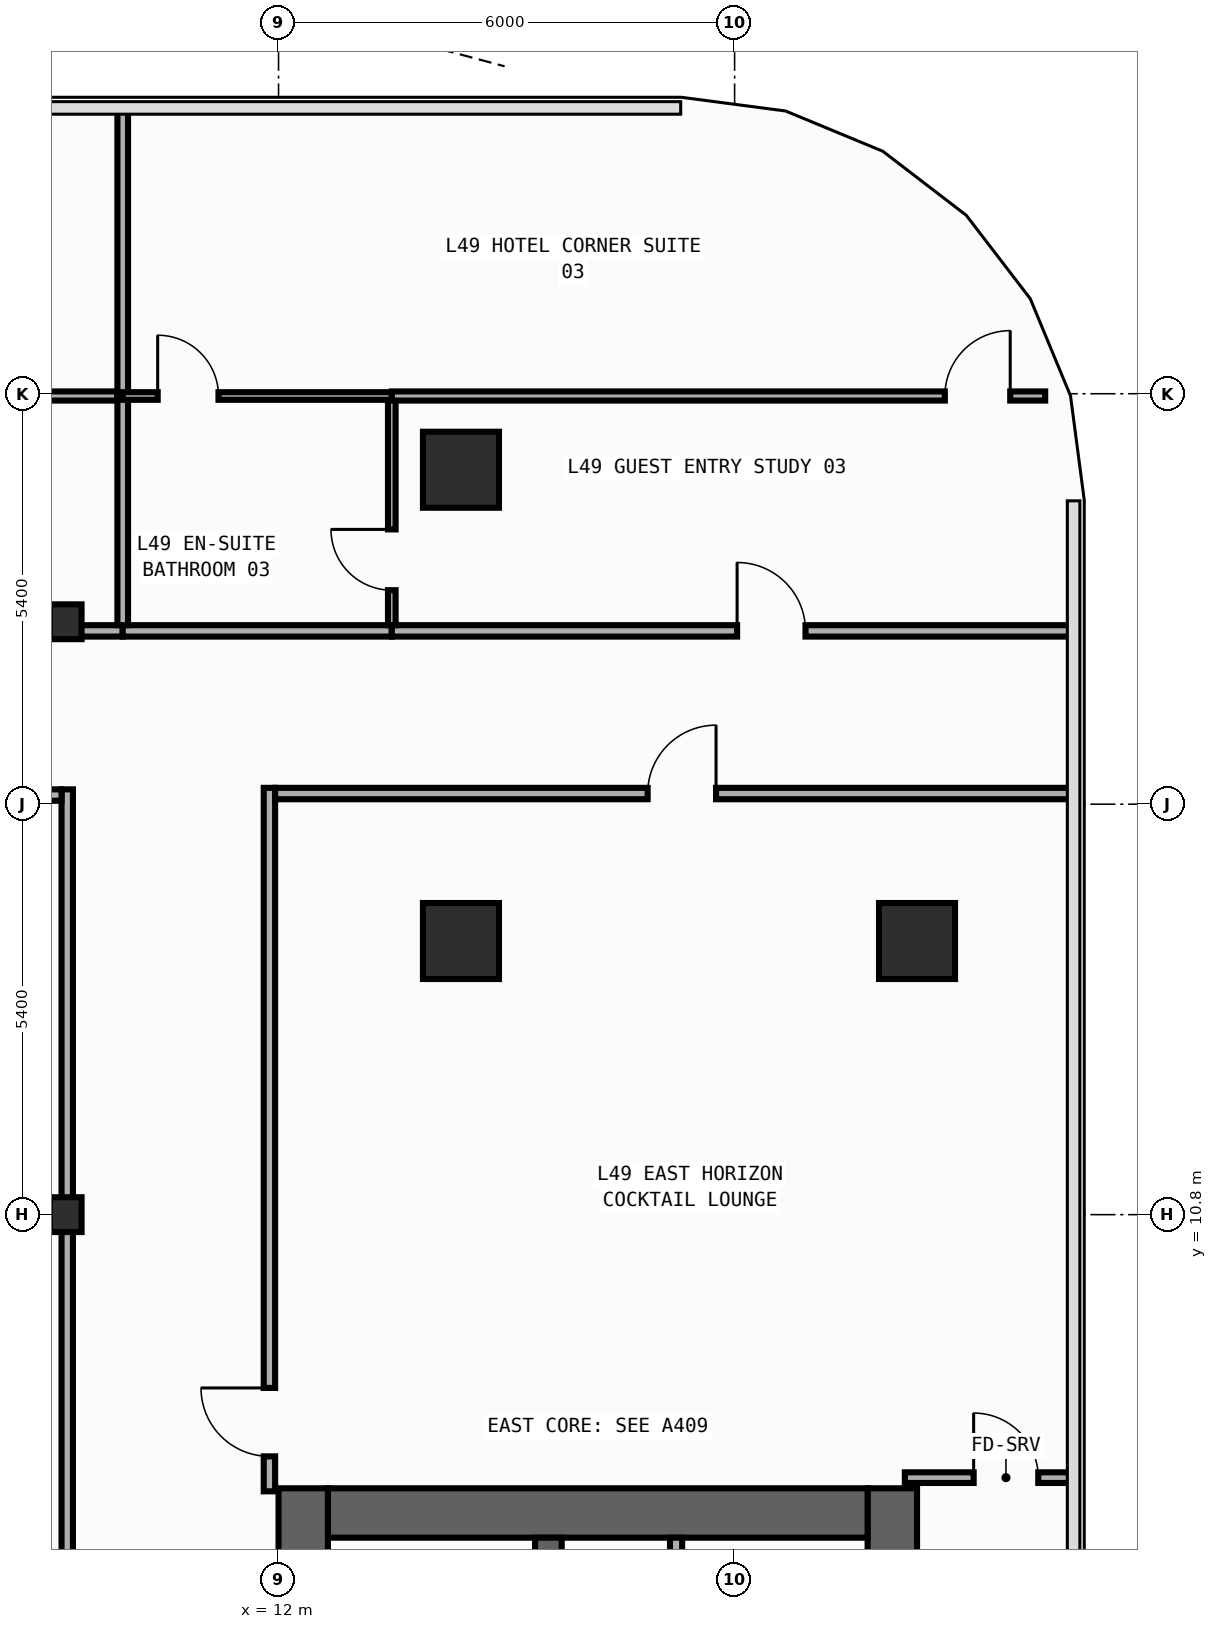
"""IFC4 building model, lengths in metres.
Left out: names, types, materials, properties, quantities, classifications, styles, units other than length and angle.
Written with IfcOpenShell. Run it as: python <this file> out.ifc"""

import sys

from ifc_helpers import new_model, si_unit, direction, frame, frame_2d, origin, origin_2d, place, context, subcontext, project, spatial, rectangle, i_section, extrude, element, fill, save


model = new_model("IFC4")
c1 = context("Model", 3, precision=1e-05, world=origin(), true_north=direction((0.0, 1.0)))
c2 = subcontext(c1, "Body", "Model", "MODEL_VIEW")
j1 = project(units=[si_unit("LENGTHUNIT", "METRE"), si_unit("PLANEANGLEUNIT", "RADIAN")], contexts=[c1])
p1 = place(None, origin())
s1 = spatial("IfcSite", under=j1, at=p1, CompositionType="ELEMENT")
p2 = place(p1, origin())
s2 = spatial("IfcBuilding", under=s1, at=p2, CompositionType="ELEMENT")
p3 = place(p2, frame((0.0, 0.0, 210.6)))
s3 = spatial("IfcBuildingStorey", under=s2, at=p3, CompositionType="ELEMENT", Elevation=210.6)
p4 = place(p3, frame((12.325, -19.8, 0.0), z_axis=(0.0, 0.0, 1.0), x_axis=(0.0, 1.0, 0.0)))
e1 = element("IfcWall", 1, at=p4, inside=s3, PredefinedType="SHEAR", context=c2, shape_type="SweptSolid", body=[
    extrude(rectangle(XDim=27.0, YDim=0.65, at=frame_2d((13.5, 0.0))), origin(), (0.0, 0.0, 1.0), 3.45),
])
p5 = place(p4, frame((23.05, 0.0, 0.0)))
e2 = element("IfcOpeningElement", 2, at=p5, cuts=e1, PredefinedType="OPENING", context=c2, shape_type="SweptSolid", body=[
    extrude(rectangle(XDim=1.1, YDim=2.2, at=frame_2d((0.55, 1.1))), frame((0.0, 0.335, 0.0), z_axis=(0.0, -1.0, 0.0), x_axis=(1.0, 0.0, 0.0)), (0.0, 0.0, 1.0), 0.67),
])
p6 = place(p4, frame((19.85, 0.0, 0.0)))
e3 = element("IfcOpeningElement", 3, at=p6, cuts=e1, PredefinedType="OPENING", context=c2, shape_type="SweptSolid", body=[
    extrude(rectangle(XDim=1.1, YDim=2.2, at=frame_2d((0.55, 1.1))), frame((0.0, 0.335, 0.0), z_axis=(0.0, -1.0, 0.0), x_axis=(1.0, 0.0, 0.0)), (0.0, 0.0, 1.0), 0.67),
])
p7 = place(p4, frame((16.65, 0.0, 0.0)))
e4 = element("IfcOpeningElement", 4, at=p7, cuts=e1, PredefinedType="OPENING", context=c2, shape_type="SweptSolid", body=[
    extrude(rectangle(XDim=1.1, YDim=2.2, at=frame_2d((0.55, 1.1))), frame((0.0, 0.335, 0.0), z_axis=(0.0, -1.0, 0.0), x_axis=(1.0, 0.0, 0.0)), (0.0, 0.0, 1.0), 0.67),
])
p8 = place(p4, frame((10.175, 0.0, 0.0)))
e5 = element("IfcOpeningElement", 5, at=p8, cuts=e1, PredefinedType="OPENING", context=c2, shape_type="SweptSolid", body=[
    extrude(rectangle(XDim=0.85, YDim=2.1, at=frame_2d((0.425, 1.05))), frame((0.0, 0.335, 0.0), z_axis=(0.0, -1.0, 0.0), x_axis=(1.0, 0.0, 0.0)), (0.0, 0.0, 1.0), 0.67),
])
p9 = place(p4, frame((12.725, 0.0, 0.0)))
e6 = element("IfcOpeningElement", 6, at=p9, cuts=e1, PredefinedType="OPENING", context=c2, shape_type="SweptSolid", body=[
    extrude(rectangle(XDim=1.15, YDim=2.2, at=frame_2d((0.575, 1.1))), frame((0.0, 0.335, 0.0), z_axis=(0.0, -1.0, 0.0), x_axis=(1.0, 0.0, 0.0)), (0.0, 0.0, 1.0), 0.67),
])
p10 = place(p4, frame((25.125, 0.0, 0.0)))
e7 = element("IfcOpeningElement", 7, at=p10, cuts=e1, PredefinedType="OPENING", context=c2, shape_type="SweptSolid", body=[
    extrude(rectangle(XDim=0.85, YDim=2.1, at=frame_2d((0.425, 1.05))), frame((0.0, 0.335, 0.0), z_axis=(0.0, -1.0, 0.0), x_axis=(1.0, 0.0, 0.0)), (0.0, 0.0, 1.0), 0.67),
])
p11 = place(p3, frame((20.075, -19.8, 0.0), z_axis=(0.0, 0.0, 1.0), x_axis=(0.0, 1.0, 0.0)))
e8 = element("IfcWall", 8, at=p11, inside=s3, PredefinedType="SHEAR", context=c2, shape_type="SweptSolid", body=[
    extrude(rectangle(XDim=27.0, YDim=0.65, at=frame_2d((13.5, 0.0))), origin(), (0.0, 0.0, 1.0), 3.45),
])
p12 = place(p3, frame((12.65, 6.875, 0.0), z_axis=(0.0, 0.0, 1.0), x_axis=(1.0, 0.0, 0.0)))
e9 = element("IfcWall", 9, at=p12, inside=s3, PredefinedType="SHEAR", context=c2, shape_type="SweptSolid", body=[
    extrude(rectangle(XDim=7.1, YDim=0.65, at=frame_2d((3.55, 0.0))), origin(), (0.0, 0.0, 1.0), 3.45),
])
p13 = place(p3, frame((15.55, -19.15, 0.0), z_axis=(0.0, 0.0, 1.0), x_axis=(0.0, 1.0, 0.0)))
e10 = element("IfcWall", 10, at=p13, inside=s3, PredefinedType="SHEAR", context=c2, shape_type="SweptSolid", body=[
    extrude(rectangle(XDim=25.7, YDim=0.35, at=frame_2d((12.85, 0.0))), origin(), (0.0, 0.0, 1.0), 3.45),
])
p14 = place(p13, frame((12.075, 0.0, 0.0)))
e11 = element("IfcOpeningElement", 11, at=p14, cuts=e10, PredefinedType="OPENING", context=c2, shape_type="SweptSolid", body=[
    extrude(rectangle(XDim=1.15, YDim=2.2, at=frame_2d((0.575, 1.1))), frame((0.0, 0.185, 0.0), z_axis=(0.0, -1.0, 0.0), x_axis=(1.0, 0.0, 0.0)), (0.0, 0.0, 1.0), 0.37),
])
p15 = place(p13, frame((24.475, 0.0, 0.0)))
e12 = element("IfcOpeningElement", 12, at=p15, cuts=e10, PredefinedType="OPENING", context=c2, shape_type="SweptSolid", body=[
    extrude(rectangle(XDim=0.85, YDim=2.1, at=frame_2d((0.425, 1.05))), frame((0.0, 0.185, 0.0), z_axis=(0.0, -1.0, 0.0), x_axis=(1.0, 0.0, 0.0)), (0.0, 0.0, 1.0), 0.37),
])
for number, where, z_axis, x_axis in (
    (13, (9.2, 10.8, 0.0), (0.0, 0.0, 1.0), (1.0, 0.0, 0.0)),
    (14, (9.2, 18.6, 0.0), (0.0, 0.0, 1.0), (1.0, 0.0, 0.0)),
):
    element("IfcColumn", number, at=place(p3, frame(where, z_axis=z_axis, x_axis=x_axis)), inside=s3, PredefinedType="COLUMN", context=c2, shape_type="SweptSolid", body=[
        extrude(i_section(OverallWidth=0.417, OverallDepth=0.458, WebThickness=0.03, FlangeThickness=0.05, FilletRadius=0.022, at=origin_2d()), origin(), (0.0, 0.0, 1.0), 3.8),
    ])
for number, where, z_axis, x_axis in (
    (15, (20.4, 14.4, 0.0), (0.0, 0.0, 1.0), (1.0, 0.0, 0.0)),
    (16, (14.4, 14.4, 0.0), (0.0, 0.0, 1.0), (1.0, 0.0, 0.0)),
    (17, (14.4, 20.6, 0.0), (0.0, 0.0, 1.0), (1.0, 0.0, 0.0)),
):
    element("IfcColumn", number, at=place(p3, frame(where, z_axis=z_axis, x_axis=x_axis)), inside=s3, PredefinedType="COLUMN", context=c2, shape_type="SweptSolid", body=[
        extrude(rectangle(XDim=1.0, YDim=1.0, at=origin_2d()), origin(), (0.0, 0.0, 1.0), 3.8),
    ])
p16 = place(p3, frame((17.23, 4.17, 0.0), z_axis=(0.0, 0.0, 1.0), x_axis=(0.0, 1.0, 0.0)))
e18 = element("IfcWall", 18, at=p16, inside=s3, PredefinedType="PARTITIONING", context=c2, shape_type="SweptSolid", body=[
    extrude(rectangle(XDim=2.38, YDim=0.16, at=frame_2d((1.19, 0.0))), origin(), (0.0, 0.0, 1.0), 3.45),
])
p17 = place(p16, frame((0.46, 0.0, 0.0)))
e19 = element("IfcOpeningElement", 19, at=p17, cuts=e18, PredefinedType="OPENING", context=c2, shape_type="SweptSolid", body=[
    extrude(rectangle(XDim=0.85, YDim=2.1, at=frame_2d((0.425, 1.05))), frame((0.0, 0.09, 0.0), z_axis=(0.0, -1.0, 0.0), x_axis=(1.0, 0.0, 0.0)), (0.0, 0.0, 1.0), 0.18),
])
p18 = place(p3, frame((9.22, 4.2, 0.0), z_axis=(0.0, 0.0, 1.0), x_axis=(0.0, 1.0, 0.0)))
e20 = element("IfcWall", 20, at=p18, inside=s3, PredefinedType="PARTITIONING", context=c2, shape_type="SweptSolid", body=[
    extrude(rectangle(XDim=12.195, YDim=0.15, at=frame_2d((6.098, 0.0))), origin(), (0.0, 0.0, 1.0), 2.862),
])
p19 = place(p18, frame((0.663, 0.0, 0.0)))
e21 = element("IfcOpeningElement", 21, at=p19, cuts=e20, PredefinedType="OPENING", context=c2, shape_type="SweptSolid", body=[
    extrude(rectangle(XDim=0.9, YDim=2.15, at=frame_2d((0.45, 1.075))), frame((0.0, 0.085, 0.0), z_axis=(0.0, -1.0, 0.0), x_axis=(1.0, 0.0, 0.0)), (0.0, 0.0, 1.0), 0.17),
])
p20 = place(p3, frame((11.88, 7.16, 0.0), z_axis=(0.0, 0.0, 1.0), x_axis=(0.0, 1.0, 0.0)))
e22 = element("IfcWall", 22, at=p20, inside=s3, PredefinedType="PARTITIONING", context=c2, shape_type="SweptSolid", body=[
    extrude(rectangle(XDim=9.255, YDim=0.15, at=frame_2d((4.627, 0.0))), origin(), (0.0, 0.0, 1.0), 3.45),
])
p21 = place(p20, frame((0.46, 0.0, 0.0)))
e23 = element("IfcOpeningElement", 23, at=p21, cuts=e22, PredefinedType="OPENING", context=c2, shape_type="SweptSolid", body=[
    extrude(rectangle(XDim=0.9, YDim=2.15, at=frame_2d((0.45, 1.075))), frame((0.0, 0.085, 0.0), z_axis=(0.0, -1.0, 0.0), x_axis=(1.0, 0.0, 0.0)), (0.0, 0.0, 1.0), 0.17),
])
p22 = place(p3, frame((-0.32, 16.32, 0.0), z_axis=(0.0, 0.0, 1.0), x_axis=(1.0, 0.0, 0.0)))
e24 = element("IfcWall", 24, at=p22, inside=s3, PredefinedType="PARTITIONING", context=c2, shape_type="SweptSolid", body=[
    extrude(rectangle(XDim=9.465, YDim=0.15, at=frame_2d((4.732, 0.0))), origin(), (0.0, 0.0, 1.0), 3.45),
])
p23 = place(p22, frame((6.898, 0.0, 0.0)))
e25 = element("IfcOpeningElement", 25, at=p23, cuts=e24, PredefinedType="OPENING", context=c2, shape_type="SweptSolid", body=[
    extrude(rectangle(XDim=0.9, YDim=2.15, at=frame_2d((0.45, 1.075))), frame((0.0, 0.085, 0.0), z_axis=(0.0, -1.0, 0.0), x_axis=(1.0, 0.0, 0.0)), (0.0, 0.0, 1.0), 0.17),
])
p24 = place(p3, frame((-0.96, 18.48, 0.0), z_axis=(0.0, 0.0, 1.0), x_axis=(1.0, 0.0, 0.0)))
e26 = element("IfcWall", 26, at=p24, inside=s3, PredefinedType="PARTITIONING", context=c2, shape_type="SweptSolid", body=[
    extrude(rectangle(XDim=10.91, YDim=0.15, at=frame_2d((5.455, 0.0))), origin(), (0.0, 0.0, 1.0), 2.862),
])
p25 = place(p24, frame((7.53, 0.0, 0.0)))
e27 = element("IfcOpeningElement", 27, at=p25, cuts=e26, PredefinedType="OPENING", context=c2, shape_type="SweptSolid", body=[
    extrude(rectangle(XDim=0.9, YDim=2.15, at=frame_2d((0.45, 1.075))), frame((0.0, 0.085, 0.0), z_axis=(0.0, -1.0, 0.0), x_axis=(1.0, 0.0, 0.0)), (0.0, 0.0, 1.0), 0.17),
])
p26 = place(p3, frame((9.95, 18.48, 0.0), z_axis=(0.0, 0.0, 1.0), x_axis=(1.0, 0.0, 0.0)))
e28 = element("IfcWall", 28, at=p26, inside=s3, PredefinedType="PARTITIONING", context=c2, shape_type="SweptSolid", body=[
    extrude(rectangle(XDim=3.54, YDim=0.15, at=frame_2d((1.77, 0.0))), origin(), (0.0, 0.0, 1.0), 3.45),
])
p27 = place(p3, frame((13.49, 18.48, 0.0), z_axis=(0.0, 0.0, 1.0), x_axis=(1.0, 0.0, 0.0)))
e29 = element("IfcWall", 29, at=p27, inside=s3, PredefinedType="PARTITIONING", context=c2, shape_type="SweptSolid", body=[
    extrude(rectangle(XDim=8.965, YDim=0.15, at=frame_2d((4.482, 0.0))), origin(), (0.0, 0.0, 1.0), 3.45),
])
p28 = place(p27, frame((4.543, 0.0, 0.0)))
e30 = element("IfcOpeningElement", 30, at=p28, cuts=e29, PredefinedType="OPENING", context=c2, shape_type="SweptSolid", body=[
    extrude(rectangle(XDim=0.9, YDim=2.15, at=frame_2d((0.45, 1.075))), frame((0.0, 0.085, 0.0), z_axis=(0.0, -1.0, 0.0), x_axis=(1.0, 0.0, 0.0)), (0.0, 0.0, 1.0), 0.17),
])
p29 = place(p3, frame((11.955, 16.34, 0.0), z_axis=(0.0, 0.0, 1.0), x_axis=(1.0, 0.0, 0.0)))
e31 = element("IfcWall", 31, at=p29, inside=s3, PredefinedType="PARTITIONING", context=c2, shape_type="SweptSolid", body=[
    extrude(rectangle(XDim=10.5, YDim=0.15, at=frame_2d((5.25, 0.0))), origin(), (0.0, 0.0, 1.0), 3.45),
])
p30 = place(p29, frame((4.901, 0.0, 0.0)))
e32 = element("IfcOpeningElement", 32, at=p30, cuts=e31, PredefinedType="OPENING", context=c2, shape_type="SweptSolid", body=[
    extrude(rectangle(XDim=0.9, YDim=2.15, at=frame_2d((0.45, 1.075))), frame((0.0, 0.085, 0.0), z_axis=(0.0, -1.0, 0.0), x_axis=(1.0, 0.0, 0.0)), (0.0, 0.0, 1.0), 0.17),
])
p31 = place(p3, frame((-0.96, 21.57, 0.0), z_axis=(0.0, 0.0, 1.0), x_axis=(1.0, 0.0, 0.0)))
e33 = element("IfcWall", 33, at=p31, inside=s3, PredefinedType="PARTITIONING", context=c2, shape_type="SweptSolid", body=[
    extrude(rectangle(XDim=10.91, YDim=0.12, at=frame_2d((5.455, 0.0))), origin(), (0.0, 0.0, 1.0), 3.45),
])
p32 = place(p31, frame((7.561, 0.0, 0.0)))
e34 = element("IfcOpeningElement", 34, at=p32, cuts=e33, PredefinedType="OPENING", context=c2, shape_type="SweptSolid", body=[
    extrude(rectangle(XDim=0.86, YDim=2.15, at=frame_2d((0.43, 1.075))), frame((0.0, 0.07, 0.0), z_axis=(0.0, -1.0, 0.0), x_axis=(1.0, 0.0, 0.0)), (0.0, 0.0, 1.0), 0.14),
])
p33 = place(p3, frame((9.95, 18.555, 0.0), z_axis=(0.0, 0.0, 1.0), x_axis=(0.0, 1.0, 0.0)))
e35 = element("IfcWall", 35, at=p33, inside=s3, PredefinedType="PARTITIONING", context=c2, shape_type="SweptSolid", body=[
    extrude(rectangle(XDim=3.015, YDim=0.14, at=frame_2d((1.508, 0.0))), origin(), (0.0, 0.0, 1.0), 3.45),
])
p34 = place(p3, frame((9.95, 21.57, 0.0), z_axis=(0.0, 0.0, 1.0), x_axis=(0.0, 1.0, 0.0)))
e36 = element("IfcWall", 36, at=p34, inside=s3, PredefinedType="PARTITIONING", context=c2, shape_type="SweptSolid", body=[
    extrude(rectangle(XDim=3.785, YDim=0.14, at=frame_2d((1.893, 0.0))), origin(), (0.0, 0.0, 1.0), 3.45),
])
p35 = place(p3, frame((13.49, 18.555, 0.0), z_axis=(0.0, 0.0, 1.0), x_axis=(0.0, 1.0, 0.0)))
e37 = element("IfcWall", 37, at=p35, inside=s3, PredefinedType="PARTITIONING", context=c2, shape_type="SweptSolid", body=[
    extrude(rectangle(XDim=2.965, YDim=0.1, at=frame_2d((1.482, 0.0))), origin(), (0.0, 0.0, 1.0), 3.45),
])
p36 = place(p35, frame((0.46, 0.0, 0.0)))
e38 = element("IfcOpeningElement", 38, at=p36, cuts=e37, PredefinedType="OPENING", context=c2, shape_type="SweptSolid", body=[
    extrude(rectangle(XDim=0.8, YDim=2.1, at=frame_2d((0.4, 1.05))), frame((0.0, 0.06, 0.0), z_axis=(0.0, -1.0, 0.0), x_axis=(1.0, 0.0, 0.0)), (0.0, 0.0, 1.0), 0.12),
])
p37 = place(p3, frame((9.95, 21.57, 0.0), z_axis=(0.0, 0.0, 1.0), x_axis=(1.0, 0.0, 0.0)))
e39 = element("IfcWall", 39, at=p37, inside=s3, PredefinedType="PARTITIONING", context=c2, shape_type="SweptSolid", body=[
    extrude(rectangle(XDim=3.54, YDim=0.1, at=frame_2d((1.77, 0.0))), origin(), (0.0, 0.0, 1.0), 3.45),
])
p38 = place(p37, frame((0.46, 0.0, 0.0)))
e40 = element("IfcOpeningElement", 40, at=p38, cuts=e39, PredefinedType="OPENING", context=c2, shape_type="SweptSolid", body=[
    extrude(rectangle(XDim=0.8, YDim=2.1, at=frame_2d((0.4, 1.05))), frame((0.0, 0.06, 0.0), z_axis=(0.0, -1.0, 0.0), x_axis=(1.0, 0.0, 0.0)), (0.0, 0.0, 1.0), 0.12),
])
p39 = place(p3, frame((13.49, 21.57, 0.0), z_axis=(0.0, 0.0, 1.0), x_axis=(1.0, 0.0, 0.0)))
e41 = element("IfcWall", 41, at=p39, inside=s3, PredefinedType="PARTITIONING", context=c2, shape_type="SweptSolid", body=[
    extrude(rectangle(XDim=8.596, YDim=0.12, at=frame_2d((4.298, 0.0))), origin(), (0.0, 0.0, 1.0), 3.45),
])
p40 = place(p39, frame((7.276, 0.0, 0.0)))
e42 = element("IfcOpeningElement", 42, at=p40, cuts=e41, PredefinedType="OPENING", context=c2, shape_type="SweptSolid", body=[
    extrude(rectangle(XDim=0.86, YDim=2.15, at=frame_2d((0.43, 1.075))), frame((0.0, 0.07, 0.0), z_axis=(0.0, -1.0, 0.0), x_axis=(1.0, 0.0, 0.0)), (0.0, 0.0, 1.0), 0.14),
])
p41 = place(p3, frame((20.24, 7.34, 0.0), z_axis=(0.0, 0.0, 1.0), x_axis=(1.0, 0.0, 0.0)))
e43 = element("IfcWall", 43, at=p41, inside=s3, PredefinedType="PARTITIONING", context=c2, shape_type="SweptSolid", body=[
    extrude(rectangle(XDim=2.215, YDim=0.14, at=frame_2d((1.107, 0.0))), origin(), (0.0, 0.0, 1.0), 3.45),
])
p42 = place(p41, frame((0.905, 0.0, 0.0)))
e44 = element("IfcOpeningElement", 44, at=p42, cuts=e43, PredefinedType="OPENING", context=c2, shape_type="SweptSolid", body=[
    extrude(rectangle(XDim=0.85, YDim=2.1, at=frame_2d((0.425, 1.05))), frame((0.0, 0.08, 0.0), z_axis=(0.0, -1.0, 0.0), x_axis=(1.0, 0.0, 0.0)), (0.0, 0.0, 1.0), 0.16),
])
p43 = place(p21, origin())
e45 = element("IfcDoor", 45, at=p43, inside=s3, OperationType="SINGLE_SWING_RIGHT", PredefinedType="DOOR", context=c2, shape_type="SweptSolid", body=[
    extrude(rectangle(XDim=0.9, YDim=2.15, at=frame_2d((0.45, 1.075))), frame((0.0, 0.025, 0.0), z_axis=(0.0, -1.0, 0.0), x_axis=(1.0, 0.0, 0.0)), (0.0, 0.0, 1.0), 0.05),
])
fill(e23, e45)
p44 = place(p28, origin())
e46 = element("IfcDoor", 46, at=p44, inside=s3, OperationType="SINGLE_SWING_LEFT", PredefinedType="DOOR", context=c2, shape_type="SweptSolid", body=[
    extrude(rectangle(XDim=0.9, YDim=2.15, at=frame_2d((0.45, 1.075))), frame((0.0, 0.025, 0.0), z_axis=(0.0, -1.0, 0.0), x_axis=(1.0, 0.0, 0.0)), (0.0, 0.0, 1.0), 0.05),
])
fill(e30, e46)
p45 = place(p30, origin())
e47 = element("IfcDoor", 47, at=p45, inside=s3, OperationType="SINGLE_SWING_RIGHT", PredefinedType="DOOR", context=c2, shape_type="SweptSolid", body=[
    extrude(rectangle(XDim=0.9, YDim=2.15, at=frame_2d((0.45, 1.075))), frame((0.0, 0.025, 0.0), z_axis=(0.0, -1.0, 0.0), x_axis=(1.0, 0.0, 0.0)), (0.0, 0.0, 1.0), 0.05),
])
fill(e32, e47)
p46 = place(p36, origin())
e48 = element("IfcDoor", 48, at=p46, inside=s3, OperationType="SINGLE_SWING_RIGHT", PredefinedType="DOOR", context=c2, shape_type="SweptSolid", body=[
    extrude(rectangle(XDim=0.8, YDim=2.1, at=frame_2d((0.4, 1.05))), frame((0.0, 0.025, 0.0), z_axis=(0.0, -1.0, 0.0), x_axis=(1.0, 0.0, 0.0)), (0.0, 0.0, 1.0), 0.05),
])
fill(e38, e48)
p47 = place(p38, origin())
e49 = element("IfcDoor", 49, at=p47, inside=s3, OperationType="SINGLE_SWING_LEFT", PredefinedType="DOOR", context=c2, shape_type="SweptSolid", body=[
    extrude(rectangle(XDim=0.8, YDim=2.1, at=frame_2d((0.4, 1.05))), frame((0.0, 0.025, 0.0), z_axis=(0.0, -1.0, 0.0), x_axis=(1.0, 0.0, 0.0)), (0.0, 0.0, 1.0), 0.05),
])
fill(e40, e49)
p48 = place(p40, origin())
e50 = element("IfcDoor", 50, at=p48, inside=s3, OperationType="SINGLE_SWING_RIGHT", PredefinedType="DOOR", context=c2, shape_type="SweptSolid", body=[
    extrude(rectangle(XDim=0.86, YDim=2.15, at=frame_2d((0.43, 1.075))), frame((0.0, 0.025, 0.0), z_axis=(0.0, -1.0, 0.0), x_axis=(1.0, 0.0, 0.0)), (0.0, 0.0, 1.0), 0.05),
])
fill(e42, e50)
p49 = place(p42, origin())
e51 = element("IfcDoor", 51, at=p49, inside=s3, OperationType="SINGLE_SWING_LEFT", PredefinedType="DOOR", context=c2, shape_type="SweptSolid", body=[
    extrude(rectangle(XDim=0.85, YDim=2.1, at=frame_2d((0.425, 1.05))), frame((0.0, 0.025, 0.0), z_axis=(0.0, -1.0, 0.0), x_axis=(1.0, 0.0, 0.0)), (0.0, 0.0, 1.0), 0.05),
])
fill(e44, e51)
save(model, sys.argv[1])
